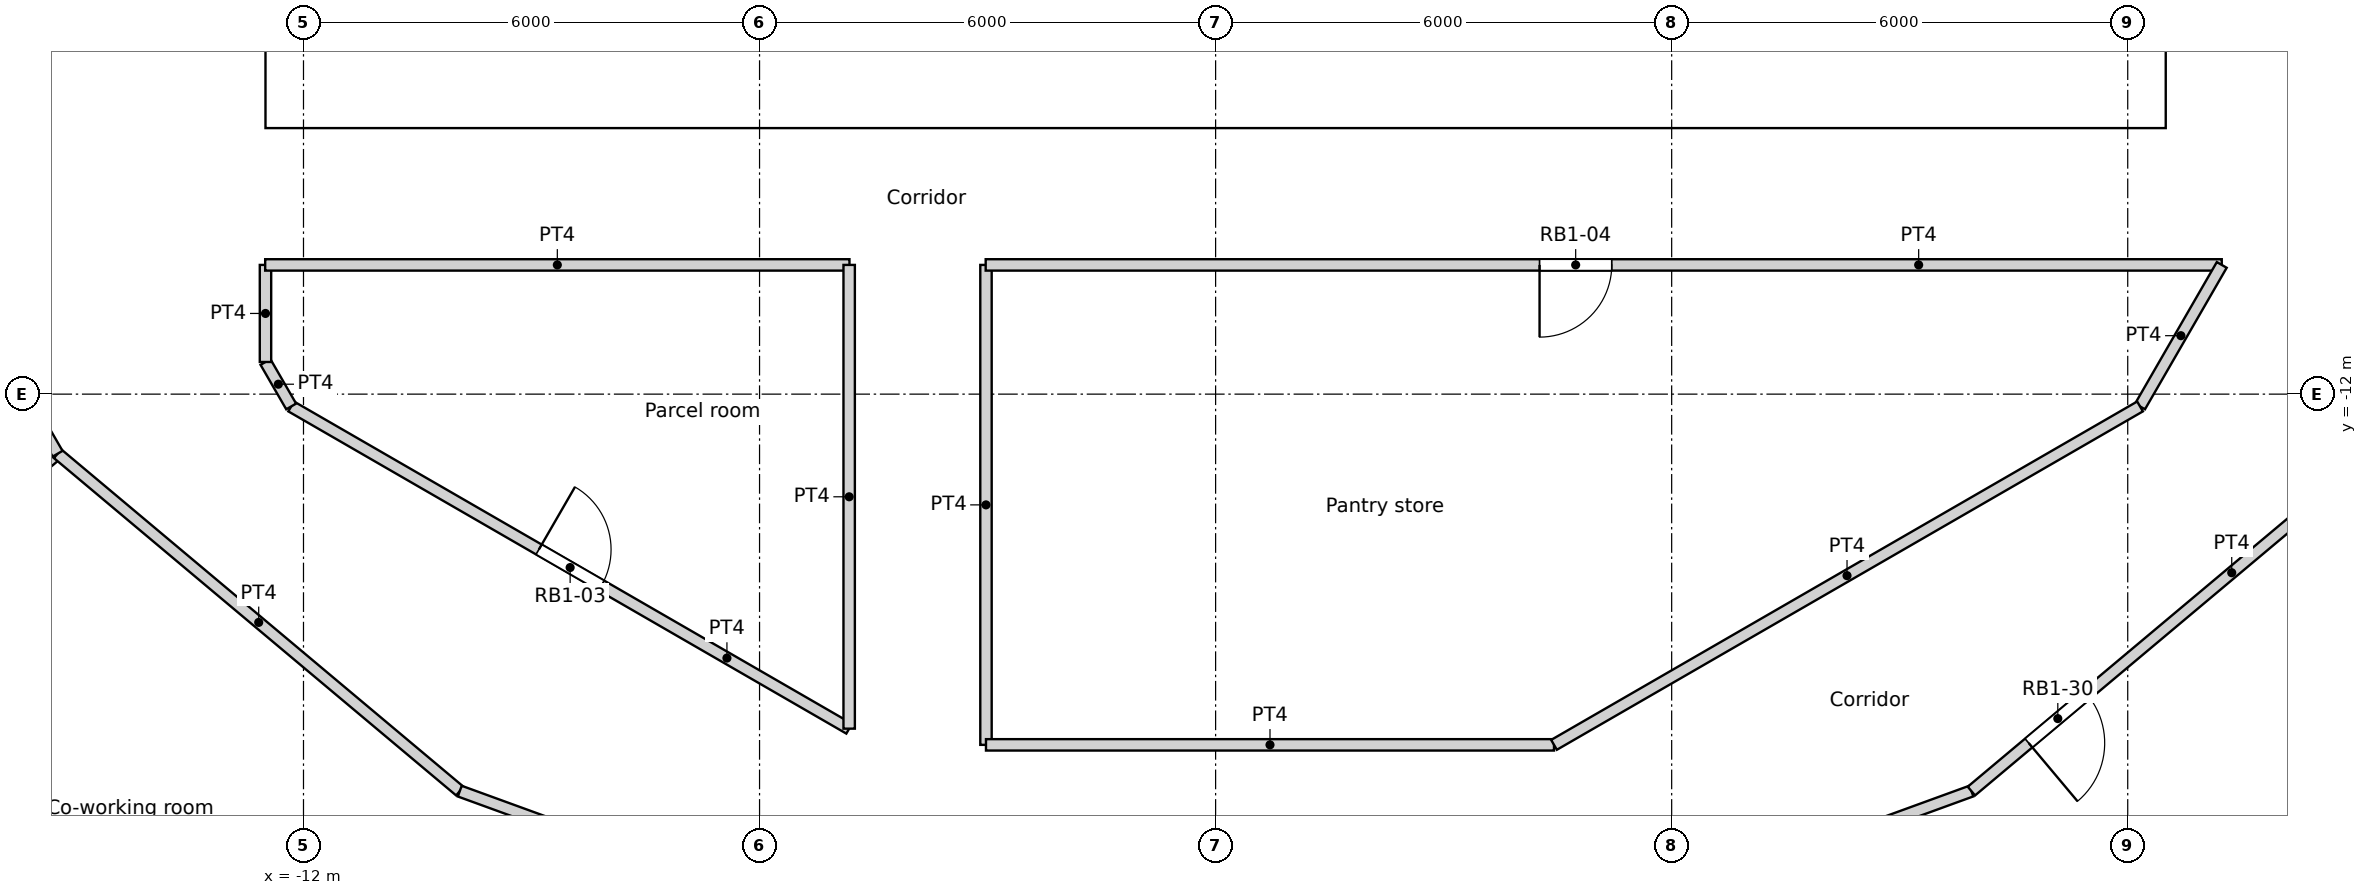
"""IFC4 building model, lengths in metres.
Left out: names, types, materials, properties, quantities, classifications, styles, units other than length and angle.
Written with IfcOpenShell. Run it as: python <this file> out.ifc"""

import sys

from ifc_helpers import new_model, si_unit, direction, frame, frame_2d, origin, origin_2d, place, context, subcontext, project, spatial, rectangle, circle, extrude, element, fill, save


model = new_model("IFC4")
c1 = context("Model", 3, precision=1e-05, world=origin(), true_north=direction((0.0, 1.0)))
c2 = subcontext(c1, "Body", "Model", "MODEL_VIEW")
j1 = project(units=[si_unit("LENGTHUNIT", "METRE"), si_unit("PLANEANGLEUNIT", "RADIAN")], contexts=[c1])
p1 = place(None, origin())
s1 = spatial("IfcSite", under=j1, at=p1, CompositionType="ELEMENT")
p2 = place(p1, origin())
s2 = spatial("IfcBuilding", under=s1, at=p2, CompositionType="ELEMENT")
p3 = place(p2, frame((0.0, 0.0, 126.0)))
s3 = spatial("IfcBuildingStorey", under=s2, at=p3, CompositionType="ELEMENT", Elevation=126.0)
for number, where, z_axis, x_axis in (
    (1, (-13.798, -12.802, 0.0), (0.0, 0.0, 1.0), (1.0, 0.0, 0.0)),
    (2, (-9.411, -16.301, 0.0), (0.0, 0.0, 1.0), (1.0, 0.0, 0.0)),
    (3, (6.876, -17.521, 0.0), (0.0, 0.0, 1.0), (1.0, 0.0, 0.0)),
    (4, (11.735, -14.716, 0.0), (0.0, 0.0, 1.0), (1.0, 0.0, 0.0)),
):
    element("IfcColumn", number, at=place(p3, frame(where, z_axis=z_axis, x_axis=x_axis)), inside=s3, PredefinedType="COLUMN", context=c2, shape_type="SweptSolid", body=[
        extrude(circle(Radius=0.65, at=origin_2d()), origin(), (0.0, 0.0, 1.0), 3.6),
    ])
p4 = place(p3, frame((-12.5, -8.05, 0.0), z_axis=(0.0, 0.0, 1.0), x_axis=(1.0, 0.0, 0.0)))
e5 = element("IfcWall", 5, at=p4, inside=s3, PredefinedType="SOLIDWALL", context=c2, shape_type="SweptSolid", body=[
    extrude(rectangle(XDim=25.0, YDim=0.9, at=frame_2d((12.5, 0.0))), origin(), (0.0, 0.0, 1.0), 3.6),
])
p5 = place(p4, frame((13.4, 0.0, 0.0)))
e6 = element("IfcOpeningElement", 6, at=p5, cuts=e5, PredefinedType="OPENING", context=c2, shape_type="SweptSolid", body=[
    extrude(rectangle(XDim=1.0, YDim=2.1, at=frame_2d((0.5, 1.05))), frame((0.0, 0.45, 0.0), z_axis=(0.0, -1.0, 0.0), x_axis=(1.0, 0.0, 0.0)), (0.0, 0.0, 1.0), 0.9),
])
p6 = place(p4, frame((8.3, 0.0, 0.0)))
e7 = element("IfcOpeningElement", 7, at=p6, cuts=e5, PredefinedType="OPENING", context=c2, shape_type="SweptSolid", body=[
    extrude(rectangle(XDim=1.8, YDim=2.1, at=frame_2d((0.9, 1.05))), frame((0.0, 0.45, 0.0), z_axis=(0.0, -1.0, 0.0), x_axis=(1.0, 0.0, 0.0)), (0.0, 0.0, 1.0), 0.9),
])
p7 = place(p4, frame((14.9, 0.0, 0.0)))
e8 = element("IfcOpeningElement", 8, at=p7, cuts=e5, PredefinedType="OPENING", context=c2, shape_type="SweptSolid", body=[
    extrude(rectangle(XDim=1.8, YDim=2.1, at=frame_2d((0.9, 1.05))), frame((0.0, 0.45, 0.0), z_axis=(0.0, -1.0, 0.0), x_axis=(1.0, 0.0, 0.0)), (0.0, 0.0, 1.0), 0.9),
])
p8 = place(p3, frame((-12.05, -7.6, 0.0), z_axis=(0.0, 0.0, 1.0), x_axis=(0.0, 1.0, 0.0)))
e9 = element("IfcWall", 9, at=p8, inside=s3, PredefinedType="SOLIDWALL", context=c2, shape_type="SweptSolid", body=[
    extrude(rectangle(XDim=15.2, YDim=0.9, at=frame_2d((7.6, 0.0))), origin(), (0.0, 0.0, 1.0), 3.6),
])
p9 = place(p8, frame((7.1, 0.0, 0.0)))
e10 = element("IfcOpeningElement", 10, at=p9, cuts=e9, PredefinedType="OPENING", context=c2, shape_type="SweptSolid", body=[
    extrude(rectangle(XDim=1.0, YDim=2.1, at=frame_2d((0.5, 1.05))), frame((0.0, 0.45, 0.0), z_axis=(0.0, -1.0, 0.0), x_axis=(1.0, 0.0, 0.0)), (0.0, 0.0, 1.0), 0.9),
])
p10 = place(p3, frame((12.05, -7.6, 0.0), z_axis=(0.0, 0.0, 1.0), x_axis=(0.0, 1.0, 0.0)))
e11 = element("IfcWall", 11, at=p10, inside=s3, PredefinedType="SOLIDWALL", context=c2, shape_type="SweptSolid", body=[
    extrude(rectangle(XDim=15.2, YDim=0.9, at=frame_2d((7.6, 0.0))), origin(), (0.0, 0.0, 1.0), 3.6),
])
p11 = place(p10, frame((5.1, 0.0, 0.0)))
e12 = element("IfcOpeningElement", 12, at=p11, cuts=e11, PredefinedType="OPENING", context=c2, shape_type="SweptSolid", body=[
    extrude(rectangle(XDim=1.0, YDim=2.1, at=frame_2d((0.5, 1.05))), frame((0.0, 0.45, 0.0), z_axis=(0.0, -1.0, 0.0), x_axis=(1.0, 0.0, 0.0)), (0.0, 0.0, 1.0), 0.9),
])
for number, where, z_axis, x_axis in (
    (13, (0.55, -7.6, 0.0), (0.0, 0.0, 1.0), (0.0, 1.0, 0.0)),
    (14, (2.25, -7.6, 0.0), (0.0, 0.0, 1.0), (0.0, 1.0, 0.0)),
):
    element("IfcWall", number, at=place(p3, frame(where, z_axis=z_axis, x_axis=x_axis)), inside=s3, PredefinedType="SOLIDWALL", context=c2, shape_type="SweptSolid", body=[
        extrude(rectangle(XDim=4.35, YDim=0.3, at=frame_2d((2.175, 0.0))), origin(), (0.0, 0.0, 1.0), 3.3),
    ])
p12 = place(p3, frame((-9.05, -7.15, 0.0), z_axis=(0.0, 0.0, 1.0), x_axis=(1.0, 0.0, 0.0)))
e15 = element("IfcWall", 15, at=p12, inside=s3, PredefinedType="SOLIDWALL", context=c2, shape_type="SweptSolid", body=[
    extrude(rectangle(XDim=4.85, YDim=0.9, at=frame_2d((2.425, 0.0))), origin(), (0.0, 0.0, 1.0), 3.3),
])
p13 = place(p3, frame((-2.4, -7.15, 0.0), z_axis=(0.0, 0.0, 1.0), x_axis=(1.0, 0.0, 0.0)))
e16 = element("IfcWall", 16, at=p13, inside=s3, PredefinedType="SOLIDWALL", context=c2, shape_type="SweptSolid", body=[
    extrude(rectangle(XDim=2.8, YDim=0.9, at=frame_2d((1.4, 0.0))), origin(), (0.0, 0.0, 1.0), 3.3),
])
p14 = place(p3, frame((4.2, -7.15, 0.0), z_axis=(0.0, 0.0, 1.0), x_axis=(1.0, 0.0, 0.0)))
e17 = element("IfcWall", 17, at=p14, inside=s3, PredefinedType="SOLIDWALL", context=c2, shape_type="SweptSolid", body=[
    extrude(rectangle(XDim=4.85, YDim=0.9, at=frame_2d((2.425, 0.0))), origin(), (0.0, 0.0, 1.0), 3.3),
])
p15 = place(p3, frame((-12.504, -10.3, 0.0), z_axis=(0.0, 0.0, 1.0), x_axis=(1.0, 0.0, 0.0)))
e18 = element("IfcWall", 18, at=p15, inside=s3, PredefinedType="PARTITIONING", context=c2, shape_type="SweptSolid", body=[
    extrude(rectangle(XDim=7.687, YDim=0.15, at=frame_2d((3.844, 0.0))), origin(), (0.0, 0.0, 1.0), 3.3),
])
p16 = place(p3, frame((-3.025, -10.3, 0.0), z_axis=(0.0, 0.0, 1.0), x_axis=(1.0, 0.0, 0.0)))
e19 = element("IfcWall", 19, at=p16, inside=s3, PredefinedType="PARTITIONING", context=c2, shape_type="SweptSolid", body=[
    extrude(rectangle(XDim=16.262, YDim=0.15, at=frame_2d((8.131, 0.0))), origin(), (0.0, 0.0, 1.0), 3.3),
])
p17 = place(p16, frame((7.287, 0.0, 0.0)))
e20 = element("IfcOpeningElement", 20, at=p17, cuts=e19, PredefinedType="OPENING", context=c2, shape_type="SweptSolid", body=[
    extrude(rectangle(XDim=0.95, YDim=2.1, at=frame_2d((0.475, 1.05))), frame((0.0, 0.075, 0.0), z_axis=(0.0, -1.0, 0.0), x_axis=(1.0, 0.0, 0.0)), (0.0, 0.0, 1.0), 0.15),
])
p18 = place(p3, frame((12.162, -12.162, 0.0), z_axis=(0.0, 0.0, 1.0), x_axis=(0.499961633463, 0.866047553582, 0.0)))
e21 = element("IfcWall", 21, at=p18, inside=s3, PredefinedType="PARTITIONING", context=c2, shape_type="SweptSolid", body=[
    extrude(rectangle(XDim=2.15, YDim=0.15, at=frame_2d((1.075, 0.0))), origin(), (0.0, 0.0, 1.0), 3.3),
])
p19 = place(p3, frame((9.943, -17.222, 0.0), z_axis=(0.0, 0.0, 1.0), x_axis=(0.766192104565, 0.642611592567, 0.0)))
e22 = element("IfcWall", 22, at=p19, inside=s3, PredefinedType="PARTITIONING", context=c2, shape_type="SweptSolid", body=[
    extrude(rectangle(XDim=6.906, YDim=0.15, at=frame_2d((3.453, 0.0))), origin(), (0.0, 0.0, 1.0), 3.3),
])
p20 = place(p19, frame((0.984, 0.0, 0.0)))
e23 = element("IfcOpeningElement", 23, at=p20, cuts=e22, PredefinedType="OPENING", context=c2, shape_type="SweptSolid", body=[
    extrude(rectangle(XDim=1.0, YDim=2.04, at=frame_2d((0.5, 1.02))), frame((0.0, 0.075, 0.0), z_axis=(0.0, -1.0, 0.0), x_axis=(1.0, 0.0, 0.0)), (0.0, 0.0, 1.0), 0.15),
])
p21 = place(p3, frame((-12.5, -11.577, 0.0), z_axis=(0.0, 0.0, 1.0), x_axis=(0.0, 1.0, 0.0)))
e24 = element("IfcWall", 24, at=p21, inside=s3, PredefinedType="PARTITIONING", context=c2, shape_type="SweptSolid", body=[
    extrude(rectangle(XDim=1.277, YDim=0.15, at=frame_2d((0.638, 0.0))), origin(), (0.0, 0.0, 1.0), 3.3),
])
p22 = place(p3, frame((-12.5, -11.577, 0.0), z_axis=(0.0, 0.0, 1.0), x_axis=(0.500024767483, -0.866011103799, 0.0)))
e25 = element("IfcWall", 25, at=p22, inside=s3, PredefinedType="PARTITIONING", context=c2, shape_type="SweptSolid", body=[
    extrude(rectangle(XDim=0.676, YDim=0.15, at=frame_2d((0.338, 0.0))), origin(), (0.0, 0.0, 1.0), 3.3),
])
p23 = place(p3, frame((-18.688, -6.802, 0.0), z_axis=(0.0, 0.0, 1.0), x_axis=(0.499914202267, -0.866074933462, 0.0)))
e26 = element("IfcWall", 26, at=p23, inside=s3, PredefinedType="PARTITIONING", context=c2, shape_type="SweptSolid", body=[
    extrude(rectangle(XDim=6.907, YDim=0.15, at=frame_2d((3.454, 0.0))), origin(), (0.0, 0.0, 1.0), 3.3),
])
p24 = place(p23, frame((3.003, 0.0, 0.0)))
e27 = element("IfcOpeningElement", 27, at=p24, cuts=e26, PredefinedType="OPENING", context=c2, shape_type="SweptSolid", body=[
    extrude(rectangle(XDim=1.0, YDim=2.04, at=frame_2d((0.5, 1.02))), frame((0.0, 0.075, 0.0), z_axis=(0.0, -1.0, 0.0), x_axis=(1.0, 0.0, 0.0)), (0.0, 0.0, 1.0), 0.15),
])
p25 = place(p3, frame((-15.235, -12.784, 0.0), z_axis=(0.0, 0.0, 1.0), x_axis=(0.766192104565, -0.642611592567, 0.0)))
e28 = element("IfcWall", 28, at=p25, inside=s3, PredefinedType="PARTITIONING", context=c2, shape_type="SweptSolid", body=[
    extrude(rectangle(XDim=6.906, YDim=0.15, at=frame_2d((3.453, 0.0))), origin(), (0.0, 0.0, 1.0), 3.3),
])
p26 = place(p3, frame((-12.162, -12.162, 0.0), z_axis=(0.0, 0.0, 1.0), x_axis=(0.866004766557, -0.500035743023, 0.0)))
e29 = element("IfcWall", 29, at=p26, inside=s3, PredefinedType="PARTITIONING", context=c2, shape_type="SweptSolid", body=[
    extrude(rectangle(XDim=8.477, YDim=0.15, at=frame_2d((4.239, 0.0))), origin(), (0.0, 0.0, 1.0), 3.3),
])
p27 = place(p26, frame((3.763, 0.0, 0.0)))
e30 = element("IfcOpeningElement", 30, at=p27, cuts=e29, PredefinedType="OPENING", context=c2, shape_type="SweptSolid", body=[
    extrude(rectangle(XDim=0.95, YDim=2.1, at=frame_2d((0.475, 1.05))), frame((0.0, 0.075, 0.0), z_axis=(0.0, -1.0, 0.0), x_axis=(1.0, 0.0, 0.0)), (0.0, 0.0, 1.0), 0.15),
])
p28 = place(p3, frame((-4.821, -16.401, 0.0), z_axis=(0.0, 0.0, 1.0), x_axis=(0.0, 1.0, 0.0)))
e31 = element("IfcWall", 31, at=p28, inside=s3, PredefinedType="PARTITIONING", context=c2, shape_type="SweptSolid", body=[
    extrude(rectangle(XDim=6.101, YDim=0.15, at=frame_2d((3.05, 0.0))), origin(), (0.0, 0.0, 1.0), 3.3),
])
p29 = place(p3, frame((-3.021, -16.614, 0.0), z_axis=(0.0, 0.0, 1.0), x_axis=(0.0, 1.0, 0.0)))
e32 = element("IfcWall", 32, at=p29, inside=s3, PredefinedType="PARTITIONING", context=c2, shape_type="SweptSolid", body=[
    extrude(rectangle(XDim=6.314, YDim=0.15, at=frame_2d((3.157, 0.0))), origin(), (0.0, 0.0, 1.0), 3.3),
])
p30 = place(p3, frame((-3.021, -16.614, 0.0), z_axis=(0.0, 0.0, 1.0), x_axis=(1.0, 0.0, 0.0)))
e33 = element("IfcWall", 33, at=p30, inside=s3, PredefinedType="PARTITIONING", context=c2, shape_type="SweptSolid", body=[
    extrude(rectangle(XDim=7.473, YDim=0.15, at=frame_2d((3.736, 0.0))), origin(), (0.0, 0.0, 1.0), 3.3),
])
p31 = place(p3, frame((4.452, -16.614, 0.0), z_axis=(0.0, 0.0, 1.0), x_axis=(0.866005203721, 0.500034985904, 0.0)))
e34 = element("IfcWall", 34, at=p31, inside=s3, PredefinedType="PARTITIONING", context=c2, shape_type="SweptSolid", body=[
    extrude(rectangle(XDim=8.903, YDim=0.15, at=frame_2d((4.452, 0.0))), origin(), (0.0, 0.0, 1.0), 3.3),
])
p32 = place(p3, frame((-9.944, -17.223, 0.0), z_axis=(0.0, 0.0, 1.0), x_axis=(0.939672634566, -0.342075050021, 0.0)))
e35 = element("IfcWall", 35, at=p32, inside=s3, PredefinedType="PARTITIONING", context=c2, shape_type="SweptSolid", body=[
    extrude(rectangle(XDim=6.908, YDim=0.15, at=frame_2d((3.454, 0.0))), origin(), (0.0, 0.0, 1.0), 3.3),
])
p33 = place(p32, frame((2.554, 0.0, 0.0)))
e36 = element("IfcOpeningElement", 36, at=p33, cuts=e35, PredefinedType="OPENING", context=c2, shape_type="SweptSolid", body=[
    extrude(rectangle(XDim=1.8, YDim=2.1, at=frame_2d((0.9, 1.05))), frame((0.0, 0.075, 0.0), z_axis=(0.0, -1.0, 0.0), x_axis=(1.0, 0.0, 0.0)), (0.0, 0.0, 1.0), 0.15),
])
p34 = place(p3, frame((3.453, -19.586, 0.0), z_axis=(0.0, 0.0, 1.0), x_axis=(0.939607544688, 0.342253797591, 0.0)))
e37 = element("IfcWall", 37, at=p34, inside=s3, PredefinedType="PARTITIONING", context=c2, shape_type="SweptSolid", body=[
    extrude(rectangle(XDim=6.908, YDim=0.15, at=frame_2d((3.454, 0.0))), origin(), (0.0, 0.0, 1.0), 3.3),
])
p35 = place(p3, frame((-19.532, -16.389, 0.0), z_axis=(0.0, 0.0, 1.0), x_axis=(0.76609059793, 0.642732600514, 0.0)))
e38 = element("IfcWall", 38, at=p35, inside=s3, PredefinedType="PARTITIONING", context=c2, shape_type="SweptSolid", body=[
    extrude(rectangle(XDim=5.609, YDim=0.15, at=frame_2d((2.804, 0.0))), origin(), (0.0, 0.0, 1.0), 3.3),
])
p36 = place(p5, origin())
e39 = element("IfcDoor", 39, at=p36, inside=s3, OperationType="SINGLE_SWING_LEFT", PredefinedType="DOOR", context=c2, shape_type="SweptSolid", body=[
    extrude(rectangle(XDim=1.0, YDim=2.1, at=frame_2d((0.5, 1.05))), frame((0.0, 0.025, 0.0), z_axis=(0.0, -1.0, 0.0), x_axis=(1.0, 0.0, 0.0)), (0.0, 0.0, 1.0), 0.05),
])
fill(e6, e39)
p37 = place(p6, origin())
e40 = element("IfcDoor", 40, at=p37, inside=s3, OperationType="DOUBLE_DOOR_SINGLE_SWING", PredefinedType="DOOR", context=c2, shape_type="SweptSolid", body=[
    extrude(rectangle(XDim=1.8, YDim=2.1, at=frame_2d((0.9, 1.05))), frame((0.0, 0.025, 0.0), z_axis=(0.0, -1.0, 0.0), x_axis=(1.0, 0.0, 0.0)), (0.0, 0.0, 1.0), 0.05),
])
fill(e7, e40)
p38 = place(p7, origin())
e41 = element("IfcDoor", 41, at=p38, inside=s3, OperationType="DOUBLE_DOOR_SINGLE_SWING", PredefinedType="DOOR", context=c2, shape_type="SweptSolid", body=[
    extrude(rectangle(XDim=1.8, YDim=2.1, at=frame_2d((0.9, 1.05))), frame((0.0, 0.025, 0.0), z_axis=(0.0, -1.0, 0.0), x_axis=(1.0, 0.0, 0.0)), (0.0, 0.0, 1.0), 0.05),
])
fill(e8, e41)
p39 = place(p27, origin())
e42 = element("IfcDoor", 42, at=p39, inside=s3, OperationType="SINGLE_SWING_LEFT", PredefinedType="DOOR", context=c2, shape_type="SweptSolid", body=[
    extrude(rectangle(XDim=0.95, YDim=2.1, at=frame_2d((0.475, 1.05))), frame((0.0, 0.025, 0.0), z_axis=(0.0, -1.0, 0.0), x_axis=(1.0, 0.0, 0.0)), (0.0, 0.0, 1.0), 0.05),
])
fill(e30, e42)
p40 = place(p17, origin())
e43 = element("IfcDoor", 43, at=p40, inside=s3, OperationType="SINGLE_SWING_RIGHT", PredefinedType="DOOR", context=c2, shape_type="SweptSolid", body=[
    extrude(rectangle(XDim=0.95, YDim=2.1, at=frame_2d((0.475, 1.05))), frame((0.0, 0.025, 0.0), z_axis=(0.0, -1.0, 0.0), x_axis=(1.0, 0.0, 0.0)), (0.0, 0.0, 1.0), 0.05),
])
fill(e20, e43)
p41 = place(p20, origin())
e44 = element("IfcDoor", 44, at=p41, inside=s3, OperationType="SINGLE_SWING_RIGHT", PredefinedType="DOOR", context=c2, shape_type="SweptSolid", body=[
    extrude(rectangle(XDim=1.0, YDim=2.04, at=frame_2d((0.5, 1.02))), frame((0.0, 0.025, 0.0), z_axis=(0.0, -1.0, 0.0), x_axis=(1.0, 0.0, 0.0)), (0.0, 0.0, 1.0), 0.05),
])
fill(e23, e44)
save(model, sys.argv[1])
